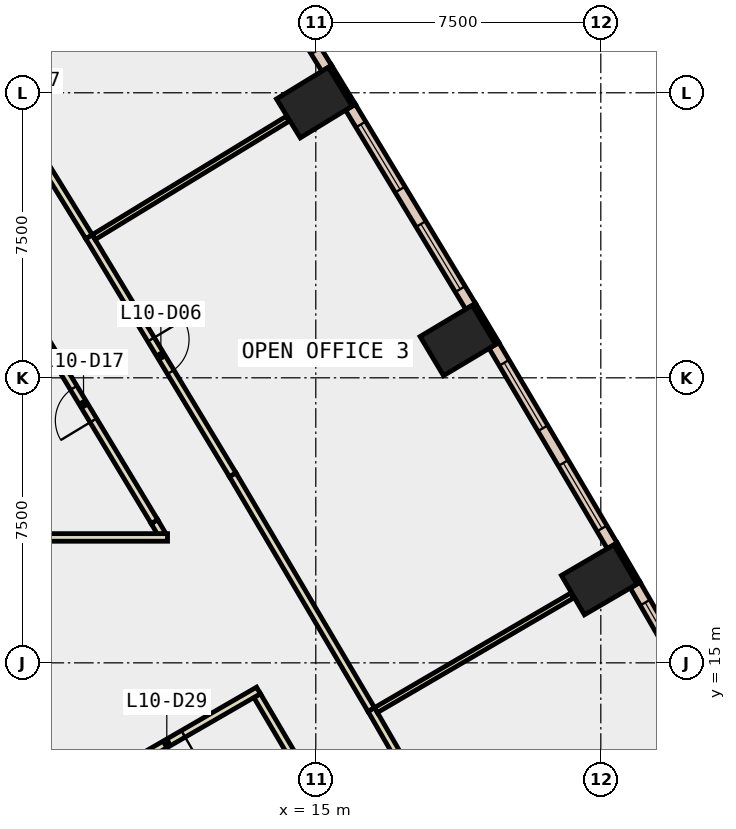
"""IFC4 building model, lengths in metres.
Left out: names, types, materials, properties, quantities, classifications, styles, units other than length and angle.
Written with IfcOpenShell. Run it as: python <this file> out.ifc"""

import sys

from ifc_helpers import new_model, si_unit, direction, frame, frame_2d, origin, origin_2d, place, context, subcontext, project, spatial, polyline, rectangle, outline, extrude, element, fill, save


model = new_model("IFC4")
c1 = context("Model", 3, precision=1e-05, world=origin(), true_north=direction((0.0, 1.0)))
c2 = subcontext(c1, "Body", "Model", "MODEL_VIEW")
j1 = project(units=[si_unit("LENGTHUNIT", "METRE"), si_unit("PLANEANGLEUNIT", "RADIAN")], contexts=[c1])
p1 = place(None, origin())
s1 = spatial("IfcSite", under=j1, at=p1, CompositionType="ELEMENT")
p2 = place(p1, origin())
s2 = spatial("IfcBuilding", under=s1, at=p2, CompositionType="ELEMENT")
p3 = place(p2, frame((0.0, 0.0, 51.8)))
s3 = spatial("IfcBuildingStorey", under=s2, at=p3, CompositionType="ELEMENT", Elevation=51.8)
for number, where, z_axis, x_axis in (
    (1, (22.457, 17.186, -0.4), (0.0, 0.0, 1.0), (-0.504, 0.864, 0.0)),
    (2, (18.739, 23.482, -0.4), (0.0, 0.0, 1.0), (-0.513, 0.858, 0.0)),
    (3, (14.961, 29.743, -0.4), (0.0, 0.0, 1.0), (-0.522, 0.853, 0.0)),
):
    element("IfcColumn", number, at=place(p3, frame(where, z_axis=z_axis, x_axis=x_axis)), inside=s3, PredefinedType="COLUMN", context=c2, shape_type="SweptSolid", body=[
        extrude(rectangle(XDim=1.2, YDim=1.6, at=origin_2d()), origin(), (0.0, 0.0, 1.0), 4.2),
    ])
p4 = place(p3, frame((0.0, 0.0, 3.6)))
e4 = element("IfcWall", 4, at=p4, inside=s3, PredefinedType="SHEAR", context=c2, shape_type="SweptSolid", body=[
    extrude(outline(polyline([(7.517, 13.48), (6.651, 12.98), (7.651, 11.248), (8.517, 11.748), (7.517, 13.48)])), origin(), (0.0, 0.0, 1.0), 0.2),
])
p5 = place(p3, frame((23.493, 17.097, 0.0), z_axis=(0.0, 0.0, 1.0), x_axis=(-0.504225229382, 0.863572184623, 0.0)))
e5 = element("IfcWall", 5, at=p5, inside=s3, PredefinedType="STANDARD", context=c2, shape_type="SweptSolid", body=[
    extrude(rectangle(XDim=1.2, YDim=0.1, at=frame_2d((0.6, 0.0))), origin(), (0.0, 0.0, 1.0), 3.8),
])
for number, where, z_axis, x_axis in (
    (6, (19.777, 23.403, 0.0), (0.0, 0.0, 1.0), (-0.513, 0.858, 0.0)),
    (7, (15.999, 29.674, 0.0), (0.0, 0.0, 1.0), (-0.522, 0.853, 0.0)),
):
    element("IfcWall", number, at=place(p3, frame(where, z_axis=z_axis, x_axis=x_axis)), inside=s3, PredefinedType="STANDARD", context=c2, shape_type="SweptSolid", body=[
        extrude(rectangle(XDim=1.2, YDim=0.1, at=frame_2d((0.6, 0.0))), origin(), (0.0, 0.0, 1.0), 3.8),
    ])
p6 = place(p3, frame((26.464, 11.745, 0.0), z_axis=(0.0, 0.0, 1.0), x_axis=(-0.499957248001, 0.866050085256, 0.0)))
e8 = element("IfcWall", 8, at=p6, inside=s3, PredefinedType="STANDARD", context=c2, shape_type="SweptSolid", body=[
    extrude(rectangle(XDim=6.121, YDim=0.3, at=frame_2d((3.06, 0.0))), origin(), (0.0, 0.0, 1.0), 3.8),
])
p7 = place(p6, frame((0.53, 0.0, 0.9)))
e9 = element("IfcOpeningElement", 9, at=p7, cuts=e8, PredefinedType="OPENING", context=c2, shape_type="SweptSolid", body=[
    extrude(rectangle(XDim=2.0, YDim=2.6, at=frame_2d((1.0, 1.3))), frame((0.0, 0.16, 0.0), z_axis=(0.0, -1.0, 0.0), x_axis=(1.0, 0.0, 0.0)), (0.0, 0.0, 1.0), 0.32),
])
p8 = place(p6, frame((3.591, 0.0, 0.9)))
e10 = element("IfcOpeningElement", 10, at=p8, cuts=e8, PredefinedType="OPENING", context=c2, shape_type="SweptSolid", body=[
    extrude(rectangle(XDim=2.0, YDim=2.6, at=frame_2d((1.0, 1.3))), frame((0.0, 0.16, 0.0), z_axis=(0.0, -1.0, 0.0), x_axis=(1.0, 0.0, 0.0)), (0.0, 0.0, 1.0), 0.32),
])
p9 = place(p3, frame((22.8, 18.08, 0.0), z_axis=(0.0, 0.0, 1.0), x_axis=(-0.508412153373, 0.861113861404, 0.0)))
e11 = element("IfcWall", 11, at=p9, inside=s3, PredefinedType="STANDARD", context=c2, shape_type="SweptSolid", body=[
    extrude(rectangle(XDim=6.121, YDim=0.3, at=frame_2d((3.061, 0.0))), origin(), (0.0, 0.0, 1.0), 3.8),
])
p10 = place(p9, frame((0.53, 0.0, 0.9)))
e12 = element("IfcOpeningElement", 12, at=p10, cuts=e11, PredefinedType="OPENING", context=c2, shape_type="SweptSolid", body=[
    extrude(rectangle(XDim=2.0, YDim=2.6, at=frame_2d((1.0, 1.3))), frame((0.0, 0.16, 0.0), z_axis=(0.0, -1.0, 0.0), x_axis=(1.0, 0.0, 0.0)), (0.0, 0.0, 1.0), 0.32),
])
p11 = place(p9, frame((3.591, 0.0, 0.9)))
e13 = element("IfcOpeningElement", 13, at=p11, cuts=e11, PredefinedType="OPENING", context=c2, shape_type="SweptSolid", body=[
    extrude(rectangle(XDim=2.0, YDim=2.6, at=frame_2d((1.0, 1.3))), frame((0.0, 0.16, 0.0), z_axis=(0.0, -1.0, 0.0), x_axis=(1.0, 0.0, 0.0)), (0.0, 0.0, 1.0), 0.32),
])
p12 = place(p3, frame((19.074, 24.38, 0.0), z_axis=(0.0, 0.0, 1.0), x_axis=(-0.516699243123, 0.856166976796, 0.0)))
e14 = element("IfcWall", 14, at=p12, inside=s3, PredefinedType="STANDARD", context=c2, shape_type="SweptSolid", body=[
    extrude(rectangle(XDim=6.122, YDim=0.3, at=frame_2d((3.061, 0.0))), origin(), (0.0, 0.0, 1.0), 3.8),
])
p13 = place(p12, frame((0.53, 0.0, 0.9)))
e15 = element("IfcOpeningElement", 15, at=p13, cuts=e14, PredefinedType="OPENING", context=c2, shape_type="SweptSolid", body=[
    extrude(rectangle(XDim=2.0, YDim=2.6, at=frame_2d((1.0, 1.3))), frame((0.0, 0.16, 0.0), z_axis=(0.0, -1.0, 0.0), x_axis=(1.0, 0.0, 0.0)), (0.0, 0.0, 1.0), 0.32),
])
p14 = place(p12, frame((3.591, 0.0, 0.9)))
e16 = element("IfcOpeningElement", 16, at=p14, cuts=e14, PredefinedType="OPENING", context=c2, shape_type="SweptSolid", body=[
    extrude(rectangle(XDim=2.0, YDim=2.6, at=frame_2d((1.0, 1.3))), frame((0.0, 0.16, 0.0), z_axis=(0.0, -1.0, 0.0), x_axis=(1.0, 0.0, 0.0)), (0.0, 0.0, 1.0), 0.32),
])
p15 = place(p3, frame((15.287, 30.644, 0.0), z_axis=(0.0, 0.0, 1.0), x_axis=(-0.525114088226, 0.851031840971, 0.0)))
e17 = element("IfcWall", 17, at=p15, inside=s3, PredefinedType="STANDARD", context=c2, shape_type="SweptSolid", body=[
    extrude(rectangle(XDim=6.121, YDim=0.3, at=frame_2d((3.061, 0.0))), origin(), (0.0, 0.0, 1.0), 3.8),
])
p16 = place(p15, frame((0.53, 0.0, 0.9)))
e18 = element("IfcOpeningElement", 18, at=p16, cuts=e17, PredefinedType="OPENING", context=c2, shape_type="SweptSolid", body=[
    extrude(rectangle(XDim=2.0, YDim=2.6, at=frame_2d((1.0, 1.3))), frame((0.0, 0.16, 0.0), z_axis=(0.0, -1.0, 0.0), x_axis=(1.0, 0.0, 0.0)), (0.0, 0.0, 1.0), 0.32),
])
p17 = place(p15, frame((3.591, 0.0, 0.9)))
e19 = element("IfcOpeningElement", 19, at=p17, cuts=e17, PredefinedType="OPENING", context=c2, shape_type="SweptSolid", body=[
    extrude(rectangle(XDim=2.0, YDim=2.6, at=frame_2d((1.0, 1.3))), frame((0.0, 0.16, 0.0), z_axis=(0.0, -1.0, 0.0), x_axis=(1.0, 0.0, 0.0)), (0.0, 0.0, 1.0), 0.32),
])
p18 = place(p3, frame((14.425, 12.497, 0.0), z_axis=(0.0, 0.0, 1.0), x_axis=(-0.508111788435, 0.861291129905, 0.0)))
e20 = element("IfcWall", 20, at=p18, inside=s3, PredefinedType="PARTITIONING", context=c2, shape_type="SweptSolid", body=[
    extrude(rectangle(XDim=1.905, YDim=0.2, at=frame_2d((0.953, 0.0))), origin(), (0.0, 0.0, 1.0), 3.8),
])
p19 = place(p3, frame((13.492, 14.274, 0.0), z_axis=(0.0, 0.0, 1.0), x_axis=(-0.866003598361, -0.5000377662, 0.0)))
e21 = element("IfcWall", 21, at=p19, inside=s3, PredefinedType="PARTITIONING", context=c2, shape_type="SweptSolid", body=[
    extrude(rectangle(XDim=5.071, YDim=0.2, at=frame_2d((2.536, 0.0))), origin(), (0.0, 0.0, 1.0), 3.8),
])
p20 = place(p19, frame((2.286, 0.0, 0.0)))
e22 = element("IfcOpeningElement", 22, at=p20, cuts=e21, PredefinedType="OPENING", context=c2, shape_type="SweptSolid", body=[
    extrude(rectangle(XDim=1.0, YDim=2.1, at=frame_2d((0.5, 1.05))), frame((0.0, 0.11, 0.0), z_axis=(0.0, -1.0, 0.0), x_axis=(1.0, 0.0, 0.0)), (0.0, 0.0, 1.0), 0.22),
])
p21 = place(p3, frame((10.948, 18.386, 0.0), z_axis=(0.0, 0.0, 1.0), x_axis=(-0.506880801681, 0.862016155815, 0.0)))
e23 = element("IfcWall", 23, at=p21, inside=s3, PredefinedType="PARTITIONING", context=c2, shape_type="SweptSolid", body=[
    extrude(rectangle(XDim=0.383, YDim=0.2, at=frame_2d((0.191, 0.0))), origin(), (0.0, 0.0, 1.0), 3.8),
])
p22 = place(p3, frame((10.754, 18.716, 0.0), z_axis=(0.0, 0.0, 1.0), x_axis=(-0.516755973305, 0.856132737403, 0.0)))
e24 = element("IfcWall", 24, at=p22, inside=s3, PredefinedType="PARTITIONING", context=c2, shape_type="SweptSolid", body=[
    extrude(rectangle(XDim=7.222, YDim=0.2, at=frame_2d((3.611, 0.0))), origin(), (0.0, 0.0, 1.0), 3.8),
])
p23 = place(p22, frame((3.111, 0.0, 0.0)))
e25 = element("IfcOpeningElement", 25, at=p23, cuts=e24, PredefinedType="OPENING", context=c2, shape_type="SweptSolid", body=[
    extrude(rectangle(XDim=1.0, YDim=2.1, at=frame_2d((0.5, 1.05))), frame((0.0, 0.11, 0.0), z_axis=(0.0, -1.0, 0.0), x_axis=(1.0, 0.0, 0.0)), (0.0, 0.0, 1.0), 0.22),
])
p24 = place(p3, frame((16.46, 13.772, 0.0), z_axis=(0.0, 0.0, 1.0), x_axis=(0.500099745063, -0.865967808286, 0.0)))
e26 = element("IfcWall", 26, at=p24, inside=s3, PredefinedType="PARTITIONING", context=c2, shape_type="SweptSolid", body=[
    extrude(rectangle(XDim=7.319, YDim=0.2, at=frame_2d((3.659, 0.0))), origin(), (0.0, 0.0, 1.0), 3.8),
])
p25 = place(p24, frame((3.159, 0.0, 0.0)))
e27 = element("IfcOpeningElement", 27, at=p25, cuts=e26, PredefinedType="OPENING", context=c2, shape_type="SweptSolid", body=[
    extrude(rectangle(XDim=1.0, YDim=2.1, at=frame_2d((0.5, 1.05))), frame((0.0, 0.11, 0.0), z_axis=(0.0, -1.0, 0.0), x_axis=(1.0, 0.0, 0.0)), (0.0, 0.0, 1.0), 0.22),
])
p26 = place(p3, frame((9.032, 26.213, 0.0), z_axis=(0.0, 0.0, 1.0), x_axis=(0.516789314756, -0.856112611841, 0.0)))
e28 = element("IfcWall", 28, at=p26, inside=s3, PredefinedType="PARTITIONING", context=c2, shape_type="SweptSolid", body=[
    extrude(rectangle(XDim=7.32, YDim=0.2, at=frame_2d((3.66, 0.0))), origin(), (0.0, 0.0, 1.0), 3.8),
])
p27 = place(p26, frame((3.16, 0.0, 0.0)))
e29 = element("IfcOpeningElement", 29, at=p27, cuts=e28, PredefinedType="OPENING", context=c2, shape_type="SweptSolid", body=[
    extrude(rectangle(XDim=1.0, YDim=2.1, at=frame_2d((0.5, 1.05))), frame((0.0, 0.11, 0.0), z_axis=(0.0, -1.0, 0.0), x_axis=(1.0, 0.0, 0.0)), (0.0, 0.0, 1.0), 0.22),
])
p28 = place(p3, frame((12.815, 19.946, 0.0), z_axis=(0.0, 0.0, 1.0), x_axis=(0.508287536166, -0.861187424768, 0.0)))
e30 = element("IfcWall", 30, at=p28, inside=s3, PredefinedType="PARTITIONING", context=c2, shape_type="SweptSolid", body=[
    extrude(rectangle(XDim=7.169, YDim=0.2, at=frame_2d((3.584, 0.0))), origin(), (0.0, 0.0, 1.0), 3.8),
])
p29 = place(p3, frame((5.267, 32.315, 0.0), z_axis=(0.0, 0.0, 1.0), x_axis=(0.524988204957, -0.851109502153, 0.0)))
e31 = element("IfcWall", 31, at=p29, inside=s3, PredefinedType="PARTITIONING", context=c2, shape_type="SweptSolid", body=[
    extrude(rectangle(XDim=7.169, YDim=0.2, at=frame_2d((3.585, 0.0))), origin(), (0.0, 0.0, 1.0), 3.8),
])
p30 = place(p29, frame((3.16, 0.0, 0.0)))
e32 = element("IfcOpeningElement", 32, at=p30, cuts=e31, PredefinedType="OPENING", context=c2, shape_type="SweptSolid", body=[
    extrude(rectangle(XDim=1.0, YDim=2.1, at=frame_2d((0.5, 1.05))), frame((0.0, 0.11, 0.0), z_axis=(0.0, -1.0, 0.0), x_axis=(1.0, 0.0, 0.0)), (0.0, 0.0, 1.0), 0.22),
])
p31 = place(p3, frame((0.4, 18.3, 0.0), z_axis=(0.0, 0.0, 1.0), x_axis=(1.0, 0.0, 0.0)))
e33 = element("IfcWall", 33, at=p31, inside=s3, PredefinedType="PARTITIONING", context=c2, shape_type="SweptSolid", body=[
    extrude(rectangle(XDim=10.699, YDim=0.2, at=frame_2d((5.35, 0.0))), origin(), (0.0, 0.0, 1.0), 3.8),
])
p32 = place(p3, frame((16.584, 13.757, 0.0), z_axis=(0.0, 0.0, 1.0), x_axis=(0.863565634474, 0.504236447469, 0.0)))
e34 = element("IfcWall", 34, at=p32, inside=s3, PredefinedType="PARTITIONING", context=c2, shape_type="SweptSolid", body=[
    extrude(rectangle(XDim=5.981, YDim=0.15, at=frame_2d((2.99, 0.0))), origin(), (0.0, 0.0, 1.0), 3.8),
])
p33 = place(p3, frame((9.156, 26.201, 0.0), z_axis=(0.0, 0.0, 1.0), x_axis=(0.853632819511, 0.520875234057, 0.0)))
e35 = element("IfcWall", 35, at=p33, inside=s3, PredefinedType="PARTITIONING", context=c2, shape_type="SweptSolid", body=[
    extrude(rectangle(XDim=5.98, YDim=0.15, at=frame_2d((2.99, 0.0))), origin(), (0.0, 0.0, 1.0), 3.8),
])
p34 = place(p3, frame((8.43, 11.698, 0.0), z_axis=(0.0, 0.0, 1.0), x_axis=(-0.50002537861, 0.866010750942, 0.0)))
e36 = element("IfcWall", 36, at=p34, inside=s3, PredefinedType="PARTITIONING", context=c2, shape_type="SweptSolid", body=[
    extrude(rectangle(XDim=2.0, YDim=0.2, at=frame_2d((1.0, 0.0))), origin(), (0.0, 0.0, 1.0), 2.4),
])
p35 = place(p34, frame((0.19, 0.0, 0.0)))
e37 = element("IfcOpeningElement", 37, at=p35, cuts=e36, PredefinedType="OPENING", context=c2, shape_type="SweptSolid", body=[
    extrude(rectangle(XDim=1.8, YDim=2.1, at=frame_2d((0.9, 1.05))), frame((0.0, 0.11, 0.0), z_axis=(0.0, -1.0, 0.0), x_axis=(1.0, 0.0, 0.0)), (0.0, 0.0, 1.0), 0.22),
])
p36 = place(p8, origin())
e38 = element("IfcWindow", 38, at=p36, inside=s3, PartitioningType="SINGLE_PANEL", PredefinedType="WINDOW", context=c2, shape_type="SweptSolid", body=[
    extrude(rectangle(XDim=2.0, YDim=2.6, at=frame_2d((1.0, 1.3))), frame((0.0, 0.03, 0.0), z_axis=(0.0, -1.0, 0.0), x_axis=(1.0, 0.0, 0.0)), (0.0, 0.0, 1.0), 0.06),
])
fill(e10, e38)
p37 = place(p10, origin())
e39 = element("IfcWindow", 39, at=p37, inside=s3, PartitioningType="SINGLE_PANEL", PredefinedType="WINDOW", context=c2, shape_type="SweptSolid", body=[
    extrude(rectangle(XDim=2.0, YDim=2.6, at=frame_2d((1.0, 1.3))), frame((0.0, 0.03, 0.0), z_axis=(0.0, -1.0, 0.0), x_axis=(1.0, 0.0, 0.0)), (0.0, 0.0, 1.0), 0.06),
])
fill(e12, e39)
p38 = place(p11, origin())
e40 = element("IfcWindow", 40, at=p38, inside=s3, PartitioningType="SINGLE_PANEL", PredefinedType="WINDOW", context=c2, shape_type="SweptSolid", body=[
    extrude(rectangle(XDim=2.0, YDim=2.6, at=frame_2d((1.0, 1.3))), frame((0.0, 0.03, 0.0), z_axis=(0.0, -1.0, 0.0), x_axis=(1.0, 0.0, 0.0)), (0.0, 0.0, 1.0), 0.06),
])
fill(e13, e40)
p39 = place(p13, origin())
e41 = element("IfcWindow", 41, at=p39, inside=s3, PartitioningType="SINGLE_PANEL", PredefinedType="WINDOW", context=c2, shape_type="SweptSolid", body=[
    extrude(rectangle(XDim=2.0, YDim=2.6, at=frame_2d((1.0, 1.3))), frame((0.0, 0.03, 0.0), z_axis=(0.0, -1.0, 0.0), x_axis=(1.0, 0.0, 0.0)), (0.0, 0.0, 1.0), 0.06),
])
fill(e15, e41)
p40 = place(p14, origin())
e42 = element("IfcWindow", 42, at=p40, inside=s3, PartitioningType="SINGLE_PANEL", PredefinedType="WINDOW", context=c2, shape_type="SweptSolid", body=[
    extrude(rectangle(XDim=2.0, YDim=2.6, at=frame_2d((1.0, 1.3))), frame((0.0, 0.03, 0.0), z_axis=(0.0, -1.0, 0.0), x_axis=(1.0, 0.0, 0.0)), (0.0, 0.0, 1.0), 0.06),
])
fill(e16, e42)
p41 = place(p27, origin())
e43 = element("IfcDoor", 43, at=p41, inside=s3, OperationType="SINGLE_SWING_LEFT", PredefinedType="DOOR", context=c2, shape_type="SweptSolid", body=[
    extrude(rectangle(XDim=1.0, YDim=2.1, at=frame_2d((0.5, 1.05))), frame((0.0, 0.025, 0.0), z_axis=(0.0, -1.0, 0.0), x_axis=(1.0, 0.0, 0.0)), (0.0, 0.0, 1.0), 0.05),
])
fill(e29, e43)
p42 = place(p23, origin())
e44 = element("IfcDoor", 44, at=p42, inside=s3, OperationType="SINGLE_SWING_LEFT", PredefinedType="DOOR", context=c2, shape_type="SweptSolid", body=[
    extrude(rectangle(XDim=1.0, YDim=2.1, at=frame_2d((0.5, 1.05))), frame((0.0, 0.025, 0.0), z_axis=(0.0, -1.0, 0.0), x_axis=(1.0, 0.0, 0.0)), (0.0, 0.0, 1.0), 0.05),
])
fill(e25, e44)
p43 = place(p20, origin())
e45 = element("IfcDoor", 45, at=p43, inside=s3, OperationType="SINGLE_SWING_LEFT", PredefinedType="DOOR", context=c2, shape_type="SweptSolid", body=[
    extrude(rectangle(XDim=1.0, YDim=2.1, at=frame_2d((0.5, 1.05))), frame((0.0, 0.025, 0.0), z_axis=(0.0, -1.0, 0.0), x_axis=(1.0, 0.0, 0.0)), (0.0, 0.0, 1.0), 0.05),
])
fill(e22, e45)
p44 = place(p35, origin())
e46 = element("IfcDoor", 46, at=p44, inside=s3, OperationType="DOUBLE_DOOR_SINGLE_SWING", PredefinedType="DOOR", context=c2, shape_type="SweptSolid", body=[
    extrude(rectangle(XDim=1.8, YDim=2.1, at=frame_2d((0.9, 1.05))), frame((0.0, 0.025, 0.0), z_axis=(0.0, -1.0, 0.0), x_axis=(1.0, 0.0, 0.0)), (0.0, 0.0, 1.0), 0.05),
])
fill(e37, e46)
save(model, sys.argv[1])
